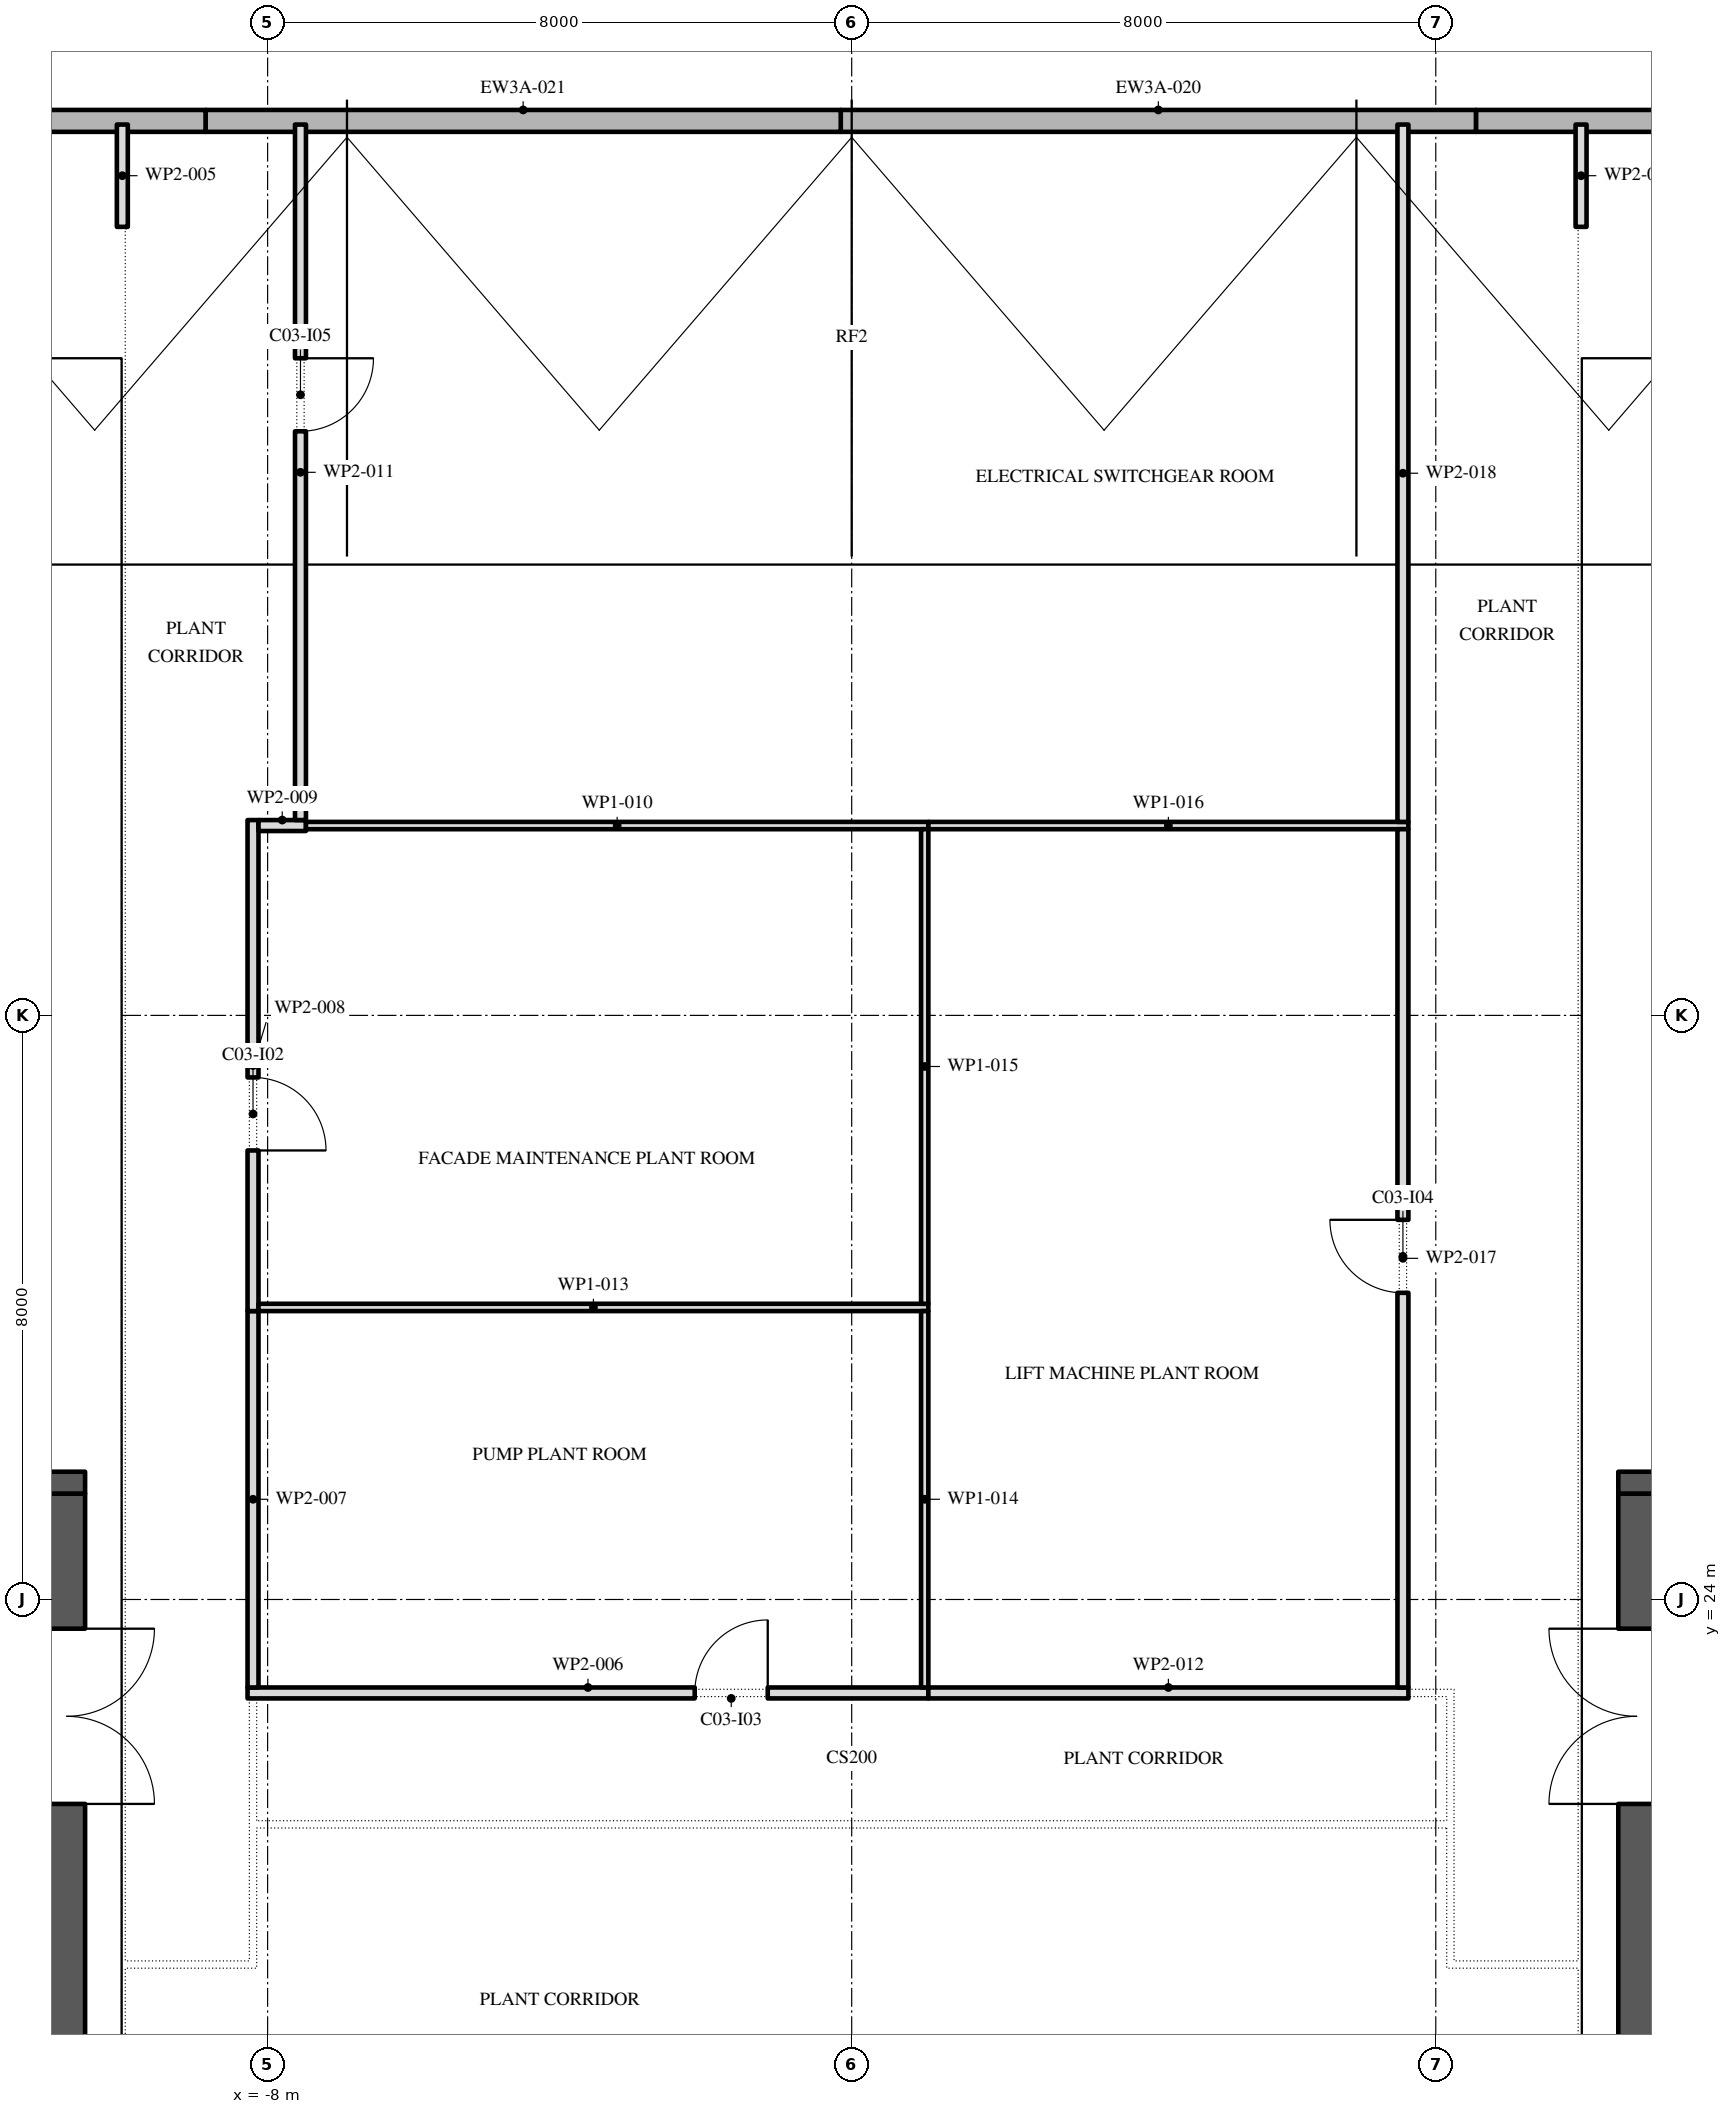
"""IFC4 building model, lengths in metres.
Left out: names, types, materials, properties, quantities, classifications, styles, units other than length and angle.
Written with IfcOpenShell. Run it as: python <this file> out.ifc"""

import sys

from ifc_helpers import new_model, si_unit, direction, frame, frame_2d, origin, place, context, subcontext, project, spatial, rectangle, extrude, element, fill, save


model = new_model("IFC4")
c1 = context("Model", 3, precision=1e-05, world=origin(), true_north=direction((0.0, 1.0)))
c2 = subcontext(c1, "Body", "Model", "MODEL_VIEW")
j1 = project(units=[si_unit("LENGTHUNIT", "METRE"), si_unit("PLANEANGLEUNIT", "RADIAN")], contexts=[c1])
p1 = place(None, origin())
s1 = spatial("IfcSite", under=j1, at=p1, CompositionType="ELEMENT")
p2 = place(p1, origin())
s2 = spatial("IfcBuilding", under=s1, at=p2, CompositionType="ELEMENT")
p3 = place(p2, frame((0.0, 0.0, 377.4)))
s3 = spatial("IfcBuildingStorey", under=s2, at=p3, CompositionType="ELEMENT", Elevation=377.4)
for number, where, z_axis, x_axis in (
    (1, (17.25, 44.251, 0.0), (0.0, 0.0, 1.0), (-1.0, 0.0, 0.0)),
    (2, (8.55, 44.251, 0.0), (0.0, 0.0, 1.0), (-1.0, 0.0, 0.0)),
):
    element("IfcWall", number, at=place(p3, frame(where, z_axis=z_axis, x_axis=x_axis)), inside=s3, PredefinedType="STANDARD", context=c2, shape_type="SweptSolid", body=[
        extrude(rectangle(XDim=8.7, YDim=0.3, at=frame_2d((4.35, 0.0))), origin(), (0.0, 0.0, 1.0), 2.2),
    ])
p4 = place(p3, frame((-0.15, 44.251, 0.0), z_axis=(0.0, 0.0, 1.0), x_axis=(-1.0, 0.0, 0.0)))
e3 = element("IfcWall", 3, at=p4, inside=s3, PredefinedType="STANDARD", context=c2, shape_type="SweptSolid", body=[
    extrude(rectangle(XDim=8.7, YDim=0.3, at=frame_2d((4.35, 0.0))), origin(), (0.0, 0.0, 1.0), 2.2),
])
p5 = place(p3, frame((-8.85, 44.251, 0.0), z_axis=(0.0, 0.0, 1.0), x_axis=(-1.0, 0.0, 0.0)))
e4 = element("IfcWall", 4, at=p5, inside=s3, PredefinedType="STANDARD", context=c2, shape_type="SweptSolid", body=[
    extrude(rectangle(XDim=8.7, YDim=0.3, at=frame_2d((4.35, 0.0))), origin(), (0.0, 0.0, 1.0), 2.2),
])
p6 = place(p3, frame((-10.75, -2.45, 0.0), z_axis=(0.0, 0.0, 1.0), x_axis=(0.0, 1.0, 0.0)))
e5 = element("IfcWall", 5, at=p6, inside=s3, PredefinedType="SHEAR", context=c2, shape_type="SweptSolid", body=[
    extrude(rectangle(XDim=27.9, YDim=0.5, at=frame_2d((13.95, 0.0))), origin(), (0.0, 0.0, 1.0), 4.0),
])
p7 = place(p6, frame((23.65, 0.0, 0.0)))
e6 = element("IfcOpeningElement", 6, at=p7, cuts=e5, PredefinedType="OPENING", context=c2, shape_type="SweptSolid", body=[
    extrude(rectangle(XDim=2.4, YDim=2.1, at=frame_2d((1.2, 1.05))), frame((0.0, 0.26, 0.0), z_axis=(0.0, -1.0, 0.0), x_axis=(1.0, 0.0, 0.0)), (0.0, 0.0, 1.0), 0.52),
])
p8 = place(p6, frame((0.788, 0.0, 0.0)))
e7 = element("IfcOpeningElement", 7, at=p8, cuts=e5, PredefinedType="OPENING", context=c2, shape_type="SweptSolid", body=[
    extrude(rectangle(XDim=0.9, YDim=2.1, at=frame_2d((0.45, 1.05))), frame((0.0, 0.26, 0.0), z_axis=(0.0, -1.0, 0.0), x_axis=(1.0, 0.0, 0.0)), (0.0, 0.0, 1.0), 0.52),
])
p9 = place(p6, frame((3.962, 0.0, 0.0)))
e8 = element("IfcOpeningElement", 8, at=p9, cuts=e5, PredefinedType="OPENING", context=c2, shape_type="SweptSolid", body=[
    extrude(rectangle(XDim=1.0, YDim=2.1, at=frame_2d((0.5, 1.05))), frame((0.0, 0.26, 0.0), z_axis=(0.0, -1.0, 0.0), x_axis=(1.0, 0.0, 0.0)), (0.0, 0.0, 1.0), 0.52),
])
p10 = place(p3, frame((-21.5, 25.6, 0.0), z_axis=(0.0, 0.0, 1.0), x_axis=(1.0, 0.0, 0.0)))
e9 = element("IfcWall", 9, at=p10, inside=s3, PredefinedType="SHEAR", context=c2, shape_type="SweptSolid", body=[
    extrude(rectangle(XDim=11.0, YDim=0.3, at=frame_2d((5.5, 0.0))), origin(), (0.0, 0.0, 1.0), 4.0),
])
p11 = place(p3, frame((10.75, -2.45, 0.0), z_axis=(0.0, 0.0, 1.0), x_axis=(0.0, 1.0, 0.0)))
e10 = element("IfcWall", 10, at=p11, inside=s3, PredefinedType="SHEAR", context=c2, shape_type="SweptSolid", body=[
    extrude(rectangle(XDim=27.9, YDim=0.5, at=frame_2d((13.95, 0.0))), origin(), (0.0, 0.0, 1.0), 4.0),
])
p12 = place(p11, frame((23.65, 0.0, 0.0)))
e11 = element("IfcOpeningElement", 11, at=p12, cuts=e10, PredefinedType="OPENING", context=c2, shape_type="SweptSolid", body=[
    extrude(rectangle(XDim=2.4, YDim=2.1, at=frame_2d((1.2, 1.05))), frame((0.0, 0.26, 0.0), z_axis=(0.0, -1.0, 0.0), x_axis=(1.0, 0.0, 0.0)), (0.0, 0.0, 1.0), 0.52),
])
p13 = place(p11, frame((1.387, 0.0, 0.0)))
e12 = element("IfcOpeningElement", 12, at=p13, cuts=e10, PredefinedType="OPENING", context=c2, shape_type="SweptSolid", body=[
    extrude(rectangle(XDim=0.9, YDim=2.1, at=frame_2d((0.45, 1.05))), frame((0.0, 0.26, 0.0), z_axis=(0.0, -1.0, 0.0), x_axis=(1.0, 0.0, 0.0)), (0.0, 0.0, 1.0), 0.52),
])
p14 = place(p11, frame((4.562, 0.0, 0.0)))
e13 = element("IfcOpeningElement", 13, at=p14, cuts=e10, PredefinedType="OPENING", context=c2, shape_type="SweptSolid", body=[
    extrude(rectangle(XDim=1.0, YDim=2.1, at=frame_2d((0.5, 1.05))), frame((0.0, 0.26, 0.0), z_axis=(0.0, -1.0, 0.0), x_axis=(1.0, 0.0, 0.0)), (0.0, 0.0, 1.0), 0.52),
])
p15 = place(p3, frame((10.5, 25.6, 0.0), z_axis=(0.0, 0.0, 1.0), x_axis=(1.0, 0.0, 0.0)))
e14 = element("IfcWall", 14, at=p15, inside=s3, PredefinedType="SHEAR", context=c2, shape_type="SweptSolid", body=[
    extrude(rectangle(XDim=11.0, YDim=0.3, at=frame_2d((5.5, 0.0))), origin(), (0.0, 0.0, 1.0), 4.0),
])
p16 = place(p3, frame((-9.99, 42.8, 0.0), z_axis=(0.0, 0.0, 1.0), x_axis=(0.0, 1.0, 0.0)))
e15 = element("IfcWall", 15, at=p16, inside=s3, PredefinedType="PARTITIONING", context=c2, shape_type="SweptSolid", body=[
    extrude(rectangle(XDim=1.401, YDim=0.15, at=frame_2d((0.7, 0.0))), origin(), (0.0, 0.0, 1.0), 4.0),
])
p17 = place(p3, frame((-8.275, 22.72, 0.0), z_axis=(0.0, 0.0, 1.0), x_axis=(1.0, 0.0, 0.0)))
e16 = element("IfcWall", 16, at=p17, inside=s3, PredefinedType="PARTITIONING", context=c2, shape_type="SweptSolid", body=[
    extrude(rectangle(XDim=9.325, YDim=0.15, at=frame_2d((4.663, 0.0))), origin(), (0.0, 0.0, 1.0), 4.0),
])
p18 = place(p17, frame((6.125, 0.0, 0.0)))
e17 = element("IfcOpeningElement", 17, at=p18, cuts=e16, PredefinedType="OPENING", context=c2, shape_type="SweptSolid", body=[
    extrude(rectangle(XDim=1.0, YDim=2.1, at=frame_2d((0.5, 1.05))), frame((0.0, 0.085, 0.0), z_axis=(0.0, -1.0, 0.0), x_axis=(1.0, 0.0, 0.0)), (0.0, 0.0, 1.0), 0.17),
])
p19 = place(p3, frame((-8.2, 27.95, 0.0), z_axis=(0.0, 0.0, 1.0), x_axis=(0.0, -1.0, 0.0)))
e18 = element("IfcWall", 18, at=p19, inside=s3, PredefinedType="PARTITIONING", context=c2, shape_type="SweptSolid", body=[
    extrude(rectangle(XDim=5.155, YDim=0.15, at=frame_2d((2.578, 0.0))), origin(), (0.0, 0.0, 1.0), 4.0),
])
p20 = place(p3, frame((-8.2, 34.675, 0.0), z_axis=(0.0, 0.0, 1.0), x_axis=(0.0, -1.0, 0.0)))
e19 = element("IfcWall", 19, at=p20, inside=s3, PredefinedType="PARTITIONING", context=c2, shape_type="SweptSolid", body=[
    extrude(rectangle(XDim=6.725, YDim=0.15, at=frame_2d((3.363, 0.0))), origin(), (0.0, 0.0, 1.0), 4.0),
])
p21 = place(p20, frame((3.525, 0.0, 0.0)))
e20 = element("IfcOpeningElement", 20, at=p21, cuts=e19, PredefinedType="OPENING", context=c2, shape_type="SweptSolid", body=[
    extrude(rectangle(XDim=1.0, YDim=2.1, at=frame_2d((0.5, 1.05))), frame((0.0, 0.085, 0.0), z_axis=(0.0, -1.0, 0.0), x_axis=(1.0, 0.0, 0.0)), (0.0, 0.0, 1.0), 0.17),
])
p22 = place(p3, frame((-7.475, 34.6, 0.0), z_axis=(0.0, 0.0, 1.0), x_axis=(-1.0, 0.0, 0.0)))
e21 = element("IfcWall", 21, at=p22, inside=s3, PredefinedType="PARTITIONING", context=c2, shape_type="SweptSolid", body=[
    extrude(rectangle(XDim=0.65, YDim=0.15, at=frame_2d((0.325, 0.0))), origin(), (0.0, 0.0, 1.0), 4.0),
])
p23 = place(p3, frame((-7.475, 34.6, 0.0), z_axis=(0.0, 0.0, 1.0), x_axis=(1.0, 0.0, 0.0)))
e22 = element("IfcWall", 22, at=p23, inside=s3, PredefinedType="PARTITIONING", context=c2, shape_type="SweptSolid", body=[
    extrude(rectangle(XDim=8.525, YDim=0.1, at=frame_2d((4.263, 0.0))), origin(), (0.0, 0.0, 1.0), 4.0),
])
p24 = place(p3, frame((-7.55, 44.201, 0.0), z_axis=(0.0, 0.0, 1.0), x_axis=(0.0, -1.0, 0.0)))
e23 = element("IfcWall", 23, at=p24, inside=s3, PredefinedType="PARTITIONING", context=c2, shape_type="SweptSolid", body=[
    extrude(rectangle(XDim=9.526, YDim=0.15, at=frame_2d((4.763, 0.0))), origin(), (0.0, 0.0, 1.0), 4.0),
])
p25 = place(p24, frame((3.201, 0.0, 0.0)))
e24 = element("IfcOpeningElement", 24, at=p25, cuts=e23, PredefinedType="OPENING", context=c2, shape_type="SweptSolid", body=[
    extrude(rectangle(XDim=1.0, YDim=2.1, at=frame_2d((0.5, 1.05))), frame((0.0, 0.085, 0.0), z_axis=(0.0, -1.0, 0.0), x_axis=(1.0, 0.0, 0.0)), (0.0, 0.0, 1.0), 0.17),
])
p26 = place(p3, frame((1.05, 22.72, 0.0), z_axis=(0.0, 0.0, 1.0), x_axis=(1.0, 0.0, 0.0)))
e25 = element("IfcWall", 25, at=p26, inside=s3, PredefinedType="PARTITIONING", context=c2, shape_type="SweptSolid", body=[
    extrude(rectangle(XDim=6.575, YDim=0.15, at=frame_2d((3.288, 0.0))), origin(), (0.0, 0.0, 1.0), 4.0),
])
p27 = place(p3, frame((1.05, 28.0, 0.0), z_axis=(0.0, 0.0, 1.0), x_axis=(-1.0, 0.0, 0.0)))
e26 = element("IfcWall", 26, at=p27, inside=s3, PredefinedType="PARTITIONING", context=c2, shape_type="SweptSolid", body=[
    extrude(rectangle(XDim=9.175, YDim=0.1, at=frame_2d((4.587, 0.0))), origin(), (0.0, 0.0, 1.0), 4.0),
])
p28 = place(p3, frame((1.0, 27.95, 0.0), z_axis=(0.0, 0.0, 1.0), x_axis=(0.0, -1.0, 0.0)))
e27 = element("IfcWall", 27, at=p28, inside=s3, PredefinedType="PARTITIONING", context=c2, shape_type="SweptSolid", body=[
    extrude(rectangle(XDim=5.155, YDim=0.1, at=frame_2d((2.578, 0.0))), origin(), (0.0, 0.0, 1.0), 4.0),
])
p29 = place(p3, frame((1.0, 34.55, 0.0), z_axis=(0.0, 0.0, 1.0), x_axis=(0.0, -1.0, 0.0)))
e28 = element("IfcWall", 28, at=p29, inside=s3, PredefinedType="PARTITIONING", context=c2, shape_type="SweptSolid", body=[
    extrude(rectangle(XDim=6.5, YDim=0.1, at=frame_2d((3.25, 0.0))), origin(), (0.0, 0.0, 1.0), 4.0),
])
p30 = place(p3, frame((1.05, 34.6, 0.0), z_axis=(0.0, 0.0, 1.0), x_axis=(1.0, 0.0, 0.0)))
e29 = element("IfcWall", 29, at=p30, inside=s3, PredefinedType="PARTITIONING", context=c2, shape_type="SweptSolid", body=[
    extrude(rectangle(XDim=6.575, YDim=0.1, at=frame_2d((3.288, 0.0))), origin(), (0.0, 0.0, 1.0), 4.0),
])
p31 = place(p3, frame((7.55, 22.795, 0.0), z_axis=(0.0, 0.0, 1.0), x_axis=(0.0, 1.0, 0.0)))
e30 = element("IfcWall", 30, at=p31, inside=s3, PredefinedType="PARTITIONING", context=c2, shape_type="SweptSolid", body=[
    extrude(rectangle(XDim=11.755, YDim=0.15, at=frame_2d((5.877, 0.0))), origin(), (0.0, 0.0, 1.0), 4.0),
])
p32 = place(p31, frame((5.405, 0.0, 0.0)))
e31 = element("IfcOpeningElement", 31, at=p32, cuts=e30, PredefinedType="OPENING", context=c2, shape_type="SweptSolid", body=[
    extrude(rectangle(XDim=1.0, YDim=2.1, at=frame_2d((0.5, 1.05))), frame((0.0, 0.085, 0.0), z_axis=(0.0, -1.0, 0.0), x_axis=(1.0, 0.0, 0.0)), (0.0, 0.0, 1.0), 0.17),
])
p33 = place(p3, frame((7.55, 34.65, 0.0), z_axis=(0.0, 0.0, 1.0), x_axis=(0.0, 1.0, 0.0)))
e32 = element("IfcWall", 32, at=p33, inside=s3, PredefinedType="PARTITIONING", context=c2, shape_type="SweptSolid", body=[
    extrude(rectangle(XDim=9.551, YDim=0.15, at=frame_2d((4.775, 0.0))), origin(), (0.0, 0.0, 1.0), 4.0),
])
p34 = place(p3, frame((9.99, 44.201, 0.0), z_axis=(0.0, 0.0, 1.0), x_axis=(0.0, -1.0, 0.0)))
e33 = element("IfcWall", 33, at=p34, inside=s3, PredefinedType="PARTITIONING", context=c2, shape_type="SweptSolid", body=[
    extrude(rectangle(XDim=1.401, YDim=0.15, at=frame_2d((0.7, 0.0))), origin(), (0.0, 0.0, 1.0), 4.0),
])
p35 = place(p7, frame((2.4, 0.0, 0.0), z_axis=(0.0, 0.0, 1.0), x_axis=(-1.0, 0.0, 0.0)))
e34 = element("IfcDoor", 34, at=p35, inside=s3, OperationType="DOUBLE_DOOR_SINGLE_SWING", PredefinedType="DOOR", context=c2, shape_type="SweptSolid", body=[
    extrude(rectangle(XDim=2.4, YDim=2.1, at=frame_2d((1.2, 1.05))), frame((0.0, 0.025, 0.0), z_axis=(0.0, -1.0, 0.0), x_axis=(1.0, 0.0, 0.0)), (0.0, 0.0, 1.0), 0.05),
])
fill(e6, e34)
p36 = place(p12, origin())
e35 = element("IfcDoor", 35, at=p36, inside=s3, OperationType="DOUBLE_DOOR_SINGLE_SWING", PredefinedType="DOOR", context=c2, shape_type="SweptSolid", body=[
    extrude(rectangle(XDim=2.4, YDim=2.1, at=frame_2d((1.2, 1.05))), frame((0.0, 0.025, 0.0), z_axis=(0.0, -1.0, 0.0), x_axis=(1.0, 0.0, 0.0)), (0.0, 0.0, 1.0), 0.05),
])
fill(e11, e35)
p37 = place(p21, origin())
e36 = element("IfcDoor", 36, at=p37, inside=s3, OperationType="SINGLE_SWING_LEFT", PredefinedType="DOOR", context=c2, shape_type="SweptSolid", body=[
    extrude(rectangle(XDim=1.0, YDim=2.1, at=frame_2d((0.5, 1.05))), frame((0.0, 0.025, 0.0), z_axis=(0.0, -1.0, 0.0), x_axis=(1.0, 0.0, 0.0)), (0.0, 0.0, 1.0), 0.05),
])
fill(e20, e36)
p38 = place(p18, origin())
e37 = element("IfcDoor", 37, at=p38, inside=s3, OperationType="SINGLE_SWING_LEFT", PredefinedType="DOOR", context=c2, shape_type="SweptSolid", body=[
    extrude(rectangle(XDim=1.0, YDim=2.1, at=frame_2d((0.5, 1.05))), frame((0.0, 0.025, 0.0), z_axis=(0.0, -1.0, 0.0), x_axis=(1.0, 0.0, 0.0)), (0.0, 0.0, 1.0), 0.05),
])
fill(e17, e37)
p39 = place(p32, origin())
e38 = element("IfcDoor", 38, at=p39, inside=s3, OperationType="SINGLE_SWING_LEFT", PredefinedType="DOOR", context=c2, shape_type="SweptSolid", body=[
    extrude(rectangle(XDim=1.0, YDim=2.1, at=frame_2d((0.5, 1.05))), frame((0.0, 0.025, 0.0), z_axis=(0.0, -1.0, 0.0), x_axis=(1.0, 0.0, 0.0)), (0.0, 0.0, 1.0), 0.05),
])
fill(e31, e38)
p40 = place(p25, origin())
e39 = element("IfcDoor", 39, at=p40, inside=s3, OperationType="SINGLE_SWING_RIGHT", PredefinedType="DOOR", context=c2, shape_type="SweptSolid", body=[
    extrude(rectangle(XDim=1.0, YDim=2.1, at=frame_2d((0.5, 1.05))), frame((0.0, 0.025, 0.0), z_axis=(0.0, -1.0, 0.0), x_axis=(1.0, 0.0, 0.0)), (0.0, 0.0, 1.0), 0.05),
])
fill(e24, e39)
save(model, sys.argv[1])
